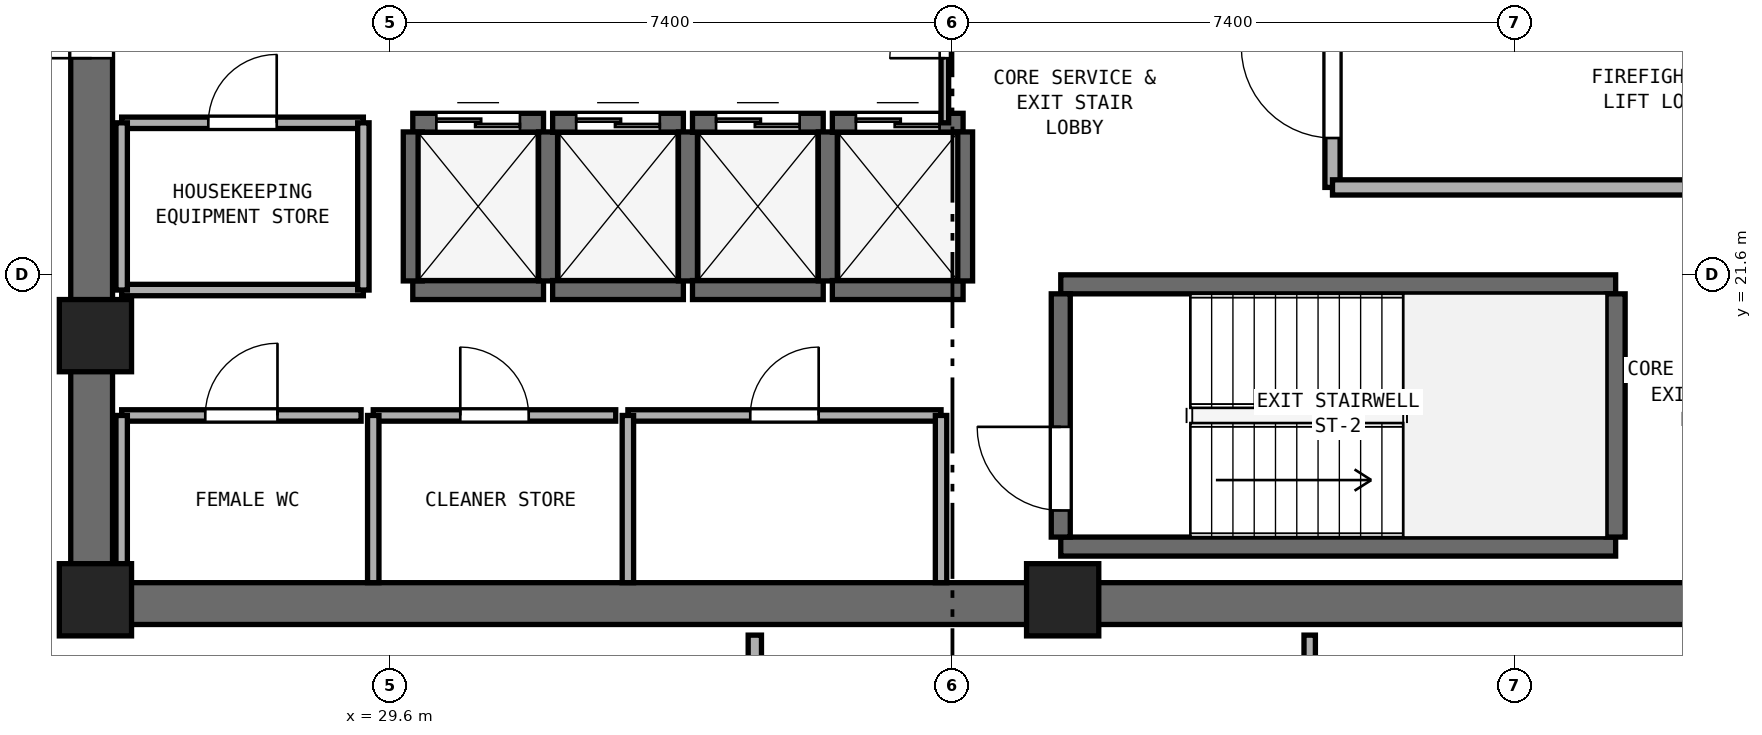
"""IFC4 building model, lengths in metres.
Left out: names, types, materials, properties, quantities, classifications, styles, units other than length and angle.
Written with IfcOpenShell. Run it as: python <this file> out.ifc"""

import sys

from ifc_helpers import new_model, si_unit, direction, frame, frame_2d, origin, origin_2d, place, context, subcontext, project, spatial, rectangle, extrude, element, fill, save


model = new_model("IFC4")
c1 = context("Model", 3, precision=1e-05, world=origin(), true_north=direction((0.0, 1.0)))
c2 = subcontext(c1, "Body", "Model", "MODEL_VIEW")
j1 = project(units=[si_unit("LENGTHUNIT", "METRE"), si_unit("PLANEANGLEUNIT", "RADIAN")], contexts=[c1])
p1 = place(None, origin())
s1 = spatial("IfcSite", under=j1, at=p1, CompositionType="ELEMENT")
p2 = place(p1, origin())
s2 = spatial("IfcBuilding", under=s1, at=p2, CompositionType="ELEMENT")
p3 = place(p2, frame((0.0, 0.0, 193.4)))
s3 = spatial("IfcBuildingStorey", under=s2, at=p3, CompositionType="ELEMENT", Elevation=193.4)
p4 = place(p3, frame((25.4, 17.275, 0.0), z_axis=(0.0, 0.0, 1.0), x_axis=(1.0, 0.0, 0.0)))
e1 = element("IfcWall", 1, at=p4, inside=s3, PredefinedType="SHEAR", context=c2, shape_type="SweptSolid", body=[
    extrude(rectangle(XDim=23.2, YDim=0.55, at=frame_2d((11.6, 0.0))), origin(), (0.0, 0.0, 1.0), 3.54),
])
p5 = place(p3, frame((25.675, 17.55, 0.0), z_axis=(0.0, 0.0, 1.0), x_axis=(0.0, 1.0, 0.0)))
e2 = element("IfcWall", 2, at=p5, inside=s3, PredefinedType="SHEAR", context=c2, shape_type="SweptSolid", body=[
    extrude(rectangle(XDim=15.3, YDim=0.55, at=frame_2d((7.65, 0.0))), origin(), (0.0, 0.0, 1.0), 3.54),
])
p6 = place(p5, frame((6.9, 0.0, 0.0)))
e3 = element("IfcOpeningElement", 3, at=p6, cuts=e2, PredefinedType="OPENING", context=c2, shape_type="SweptSolid", body=[
    extrude(rectangle(XDim=1.5, YDim=2.15, at=frame_2d((0.75, 1.075))), frame((0.0, 0.285, 0.0), z_axis=(0.0, -1.0, 0.0), x_axis=(1.0, 0.0, 0.0)), (0.0, 0.0, 1.0), 0.57),
])
for number, where, z_axis, x_axis in (
    (4, (25.725, 17.325, 0.0), (0.0, 0.0, 1.0), (1.0, 0.0, 0.0)),
    (5, (38.45, 17.325, 0.0), (0.0, 0.0, 1.0), (1.0, 0.0, 0.0)),
    (6, (25.725, 20.8, 0.0), (0.0, 0.0, 1.0), (1.0, 0.0, 0.0)),
):
    element("IfcColumn", number, at=place(p3, frame(where, z_axis=z_axis, x_axis=x_axis)), inside=s3, PredefinedType="PILASTER", context=c2, shape_type="SweptSolid", body=[
        extrude(rectangle(XDim=0.95, YDim=0.95, at=origin_2d()), origin(), (0.0, 0.0, 1.0), 3.8),
    ])
for number, where, z_axis, x_axis in (
    (7, (38.425, 18.025, 0.0), (0.0, 0.0, 1.0), (1.0, 0.0, 0.0)),
    (8, (38.425, 21.475, 0.0), (0.0, 0.0, 1.0), (1.0, 0.0, 0.0)),
):
    element("IfcWall", number, at=place(p3, frame(where, z_axis=z_axis, x_axis=x_axis)), inside=s3, PredefinedType="SHEAR", context=c2, shape_type="SweptSolid", body=[
        extrude(rectangle(XDim=7.3, YDim=0.25, at=frame_2d((3.65, 0.0))), origin(), (0.0, 0.0, 1.0), 3.54),
    ])
p7 = place(p3, frame((38.425, 18.15, 0.0), z_axis=(0.0, 0.0, 1.0), x_axis=(0.0, 1.0, 0.0)))
e9 = element("IfcWall", 9, at=p7, inside=s3, PredefinedType="SHEAR", context=c2, shape_type="SweptSolid", body=[
    extrude(rectangle(XDim=3.2, YDim=0.25, at=frame_2d((1.6, 0.0))), origin(), (0.0, 0.0, 1.0), 3.54),
])
p8 = place(p7, frame((0.35, 0.0, 0.0)))
e10 = element("IfcOpeningElement", 10, at=p8, cuts=e9, PredefinedType="OPENING", context=c2, shape_type="SweptSolid", body=[
    extrude(rectangle(XDim=1.1, YDim=2.15, at=frame_2d((0.55, 1.075))), frame((0.0, 0.135, 0.0), z_axis=(0.0, -1.0, 0.0), x_axis=(1.0, 0.0, 0.0)), (0.0, 0.0, 1.0), 0.27),
])
p9 = place(p3, frame((45.725, 18.15, 0.0), z_axis=(0.0, 0.0, 1.0), x_axis=(0.0, 1.0, 0.0)))
e11 = element("IfcWall", 11, at=p9, inside=s3, PredefinedType="SHEAR", context=c2, shape_type="SweptSolid", body=[
    extrude(rectangle(XDim=3.2, YDim=0.25, at=frame_2d((1.6, 0.0))), origin(), (0.0, 0.0, 1.0), 3.54),
])
p10 = place(p3, frame((29.9, 21.4, 0.0), z_axis=(0.0, 0.0, 1.0), x_axis=(1.0, 0.0, 0.0)))
e12 = element("IfcWall", 12, at=p10, inside=s3, PredefinedType="SHEAR", context=c2, shape_type="SweptSolid", body=[
    extrude(rectangle(XDim=1.72, YDim=0.25, at=frame_2d((0.86, 0.0))), origin(), (0.0, 0.0, 1.0), 3.54),
])
p11 = place(p3, frame((29.9, 23.6, 0.0), z_axis=(0.0, 0.0, 1.0), x_axis=(1.0, 0.0, 0.0)))
e13 = element("IfcWall", 13, at=p11, inside=s3, PredefinedType="SHEAR", context=c2, shape_type="SweptSolid", body=[
    extrude(rectangle(XDim=1.72, YDim=0.25, at=frame_2d((0.86, 0.0))), origin(), (0.0, 0.0, 1.0), 3.54),
])
p12 = place(p11, frame((0.31, 0.0, 0.0)))
e14 = element("IfcOpeningElement", 14, at=p12, cuts=e13, PredefinedType="OPENING", context=c2, shape_type="SweptSolid", body=[
    extrude(rectangle(XDim=1.1, YDim=2.15, at=frame_2d((0.55, 1.075))), frame((0.0, 0.135, 0.0), z_axis=(0.0, -1.0, 0.0), x_axis=(1.0, 0.0, 0.0)), (0.0, 0.0, 1.0), 0.27),
])
for number, where, z_axis, x_axis in (
    (15, (29.9, 21.52, 0.0), (0.0, 0.0, 1.0), (0.0, 1.0, 0.0)),
    (16, (31.68, 21.52, 0.0), (0.0, 0.0, 1.0), (0.0, 1.0, 0.0)),
):
    element("IfcWall", number, at=place(p3, frame(where, z_axis=z_axis, x_axis=x_axis)), inside=s3, PredefinedType="SHEAR", context=c2, shape_type="SweptSolid", body=[
        extrude(rectangle(XDim=1.96, YDim=0.25, at=frame_2d((0.98, 0.0))), origin(), (0.0, 0.0, 1.0), 3.54),
    ])
p13 = place(p3, frame((31.74, 21.4, 0.0), z_axis=(0.0, 0.0, 1.0), x_axis=(1.0, 0.0, 0.0)))
e17 = element("IfcWall", 17, at=p13, inside=s3, PredefinedType="SHEAR", context=c2, shape_type="SweptSolid", body=[
    extrude(rectangle(XDim=1.72, YDim=0.25, at=frame_2d((0.86, 0.0))), origin(), (0.0, 0.0, 1.0), 3.54),
])
p14 = place(p3, frame((31.74, 23.6, 0.0), z_axis=(0.0, 0.0, 1.0), x_axis=(1.0, 0.0, 0.0)))
e18 = element("IfcWall", 18, at=p14, inside=s3, PredefinedType="SHEAR", context=c2, shape_type="SweptSolid", body=[
    extrude(rectangle(XDim=1.72, YDim=0.25, at=frame_2d((0.86, 0.0))), origin(), (0.0, 0.0, 1.0), 3.54),
])
p15 = place(p14, frame((0.31, 0.0, 0.0)))
e19 = element("IfcOpeningElement", 19, at=p15, cuts=e18, PredefinedType="OPENING", context=c2, shape_type="SweptSolid", body=[
    extrude(rectangle(XDim=1.1, YDim=2.15, at=frame_2d((0.55, 1.075))), frame((0.0, 0.135, 0.0), z_axis=(0.0, -1.0, 0.0), x_axis=(1.0, 0.0, 0.0)), (0.0, 0.0, 1.0), 0.27),
])
p16 = place(p3, frame((33.52, 21.52, 0.0), z_axis=(0.0, 0.0, 1.0), x_axis=(0.0, 1.0, 0.0)))
e20 = element("IfcWall", 20, at=p16, inside=s3, PredefinedType="SHEAR", context=c2, shape_type="SweptSolid", body=[
    extrude(rectangle(XDim=1.96, YDim=0.25, at=frame_2d((0.98, 0.0))), origin(), (0.0, 0.0, 1.0), 3.54),
])
p17 = place(p3, frame((33.58, 21.4, 0.0), z_axis=(0.0, 0.0, 1.0), x_axis=(1.0, 0.0, 0.0)))
e21 = element("IfcWall", 21, at=p17, inside=s3, PredefinedType="SHEAR", context=c2, shape_type="SweptSolid", body=[
    extrude(rectangle(XDim=1.72, YDim=0.25, at=frame_2d((0.86, 0.0))), origin(), (0.0, 0.0, 1.0), 3.54),
])
p18 = place(p3, frame((33.58, 23.6, 0.0), z_axis=(0.0, 0.0, 1.0), x_axis=(1.0, 0.0, 0.0)))
e22 = element("IfcWall", 22, at=p18, inside=s3, PredefinedType="SHEAR", context=c2, shape_type="SweptSolid", body=[
    extrude(rectangle(XDim=1.72, YDim=0.25, at=frame_2d((0.86, 0.0))), origin(), (0.0, 0.0, 1.0), 3.54),
])
p19 = place(p18, frame((0.31, 0.0, 0.0)))
e23 = element("IfcOpeningElement", 23, at=p19, cuts=e22, PredefinedType="OPENING", context=c2, shape_type="SweptSolid", body=[
    extrude(rectangle(XDim=1.1, YDim=2.15, at=frame_2d((0.55, 1.075))), frame((0.0, 0.135, 0.0), z_axis=(0.0, -1.0, 0.0), x_axis=(1.0, 0.0, 0.0)), (0.0, 0.0, 1.0), 0.27),
])
p20 = place(p3, frame((35.36, 21.52, 0.0), z_axis=(0.0, 0.0, 1.0), x_axis=(0.0, 1.0, 0.0)))
e24 = element("IfcWall", 24, at=p20, inside=s3, PredefinedType="SHEAR", context=c2, shape_type="SweptSolid", body=[
    extrude(rectangle(XDim=1.96, YDim=0.25, at=frame_2d((0.98, 0.0))), origin(), (0.0, 0.0, 1.0), 3.54),
])
p21 = place(p3, frame((35.42, 21.4, 0.0), z_axis=(0.0, 0.0, 1.0), x_axis=(1.0, 0.0, 0.0)))
e25 = element("IfcWall", 25, at=p21, inside=s3, PredefinedType="SHEAR", context=c2, shape_type="SweptSolid", body=[
    extrude(rectangle(XDim=1.72, YDim=0.25, at=frame_2d((0.86, 0.0))), origin(), (0.0, 0.0, 1.0), 3.54),
])
p22 = place(p3, frame((35.42, 23.6, 0.0), z_axis=(0.0, 0.0, 1.0), x_axis=(1.0, 0.0, 0.0)))
e26 = element("IfcWall", 26, at=p22, inside=s3, PredefinedType="SHEAR", context=c2, shape_type="SweptSolid", body=[
    extrude(rectangle(XDim=1.72, YDim=0.25, at=frame_2d((0.86, 0.0))), origin(), (0.0, 0.0, 1.0), 3.54),
])
p23 = place(p22, frame((0.31, 0.0, 0.0)))
e27 = element("IfcOpeningElement", 27, at=p23, cuts=e26, PredefinedType="OPENING", context=c2, shape_type="SweptSolid", body=[
    extrude(rectangle(XDim=1.1, YDim=2.15, at=frame_2d((0.55, 1.075))), frame((0.0, 0.135, 0.0), z_axis=(0.0, -1.0, 0.0), x_axis=(1.0, 0.0, 0.0)), (0.0, 0.0, 1.0), 0.27),
])
p24 = place(p3, frame((37.14, 21.52, 0.0), z_axis=(0.0, 0.0, 1.0), x_axis=(0.0, 1.0, 0.0)))
e28 = element("IfcWall", 28, at=p24, inside=s3, PredefinedType="SHEAR", context=c2, shape_type="SweptSolid", body=[
    extrude(rectangle(XDim=1.96, YDim=0.25, at=frame_2d((0.98, 0.0))), origin(), (0.0, 0.0, 1.0), 3.54),
])
p25 = place(p3, frame((42.0, 22.75, 0.0), z_axis=(0.0, 0.0, 1.0), x_axis=(0.0, 1.0, 0.0)))
e29 = element("IfcWall", 29, at=p25, inside=s3, PredefinedType="SOLIDWALL", context=c2, shape_type="SweptSolid", body=[
    extrude(rectangle(XDim=6.05, YDim=0.2, at=frame_2d((3.025, 0.0))), origin(), (0.0, 0.0, 1.0), 3.54),
])
p26 = place(p25, frame((0.65, 0.0, 0.0)))
e30 = element("IfcOpeningElement", 30, at=p26, cuts=e29, PredefinedType="OPENING", context=c2, shape_type="SweptSolid", body=[
    extrude(rectangle(XDim=1.2, YDim=2.15, at=frame_2d((0.6, 1.075))), frame((0.0, 0.11, 0.0), z_axis=(0.0, -1.0, 0.0), x_axis=(1.0, 0.0, 0.0)), (0.0, 0.0, 1.0), 0.22),
])
p27 = place(p3, frame((42.0, 22.75, 0.0), z_axis=(0.0, 0.0, 1.0), x_axis=(1.0, 0.0, 0.0)))
e31 = element("IfcWall", 31, at=p27, inside=s3, PredefinedType="SOLIDWALL", context=c2, shape_type="SweptSolid", body=[
    extrude(rectangle(XDim=6.05, YDim=0.2, at=frame_2d((3.025, 0.0))), origin(), (0.0, 0.0, 1.0), 3.54),
])
p28 = place(p3, frame((26.07, 19.75, 0.0), z_axis=(0.0, 0.0, 1.0), x_axis=(1.0, 0.0, 0.0)))
e32 = element("IfcWall", 32, at=p28, inside=s3, PredefinedType="PARTITIONING", context=c2, shape_type="SweptSolid", body=[
    extrude(rectangle(XDim=3.15, YDim=0.15, at=frame_2d((1.575, 0.0))), origin(), (0.0, 0.0, 1.0), 3.54),
])
p29 = place(p28, frame((1.1, 0.0, 0.0)))
e33 = element("IfcOpeningElement", 33, at=p29, cuts=e32, PredefinedType="OPENING", context=c2, shape_type="SweptSolid", body=[
    extrude(rectangle(XDim=0.95, YDim=2.1, at=frame_2d((0.475, 1.05))), frame((0.0, 0.085, 0.0), z_axis=(0.0, -1.0, 0.0), x_axis=(1.0, 0.0, 0.0)), (0.0, 0.0, 1.0), 0.17),
])
p30 = place(p3, frame((26.07, 17.55, 0.0), z_axis=(0.0, 0.0, 1.0), x_axis=(0.0, 1.0, 0.0)))
e34 = element("IfcWall", 34, at=p30, inside=s3, PredefinedType="PARTITIONING", context=c2, shape_type="SweptSolid", body=[
    extrude(rectangle(XDim=2.2, YDim=0.15, at=frame_2d((1.1, 0.0))), origin(), (0.0, 0.0, 1.0), 2.64),
])
p31 = place(p3, frame((29.38, 19.75, 0.0), z_axis=(0.0, 0.0, 1.0), x_axis=(1.0, 0.0, 0.0)))
e35 = element("IfcWall", 35, at=p31, inside=s3, PredefinedType="PARTITIONING", context=c2, shape_type="SweptSolid", body=[
    extrude(rectangle(XDim=3.19, YDim=0.15, at=frame_2d((1.595, 0.0))), origin(), (0.0, 0.0, 1.0), 3.54),
])
p32 = place(p31, frame((1.145, 0.0, 0.0)))
e36 = element("IfcOpeningElement", 36, at=p32, cuts=e35, PredefinedType="OPENING", context=c2, shape_type="SweptSolid", body=[
    extrude(rectangle(XDim=0.9, YDim=2.1, at=frame_2d((0.45, 1.05))), frame((0.0, 0.085, 0.0), z_axis=(0.0, -1.0, 0.0), x_axis=(1.0, 0.0, 0.0)), (0.0, 0.0, 1.0), 0.17),
])
p33 = place(p3, frame((29.38, 17.55, 0.0), z_axis=(0.0, 0.0, 1.0), x_axis=(0.0, 1.0, 0.0)))
e37 = element("IfcWall", 37, at=p33, inside=s3, PredefinedType="PARTITIONING", context=c2, shape_type="SweptSolid", body=[
    extrude(rectangle(XDim=2.2, YDim=0.15, at=frame_2d((1.1, 0.0))), origin(), (0.0, 0.0, 1.0), 3.54),
])
p34 = place(p3, frame((32.73, 19.75, 0.0), z_axis=(0.0, 0.0, 1.0), x_axis=(1.0, 0.0, 0.0)))
e38 = element("IfcWall", 38, at=p34, inside=s3, PredefinedType="PARTITIONING", context=c2, shape_type="SweptSolid", body=[
    extrude(rectangle(XDim=4.12, YDim=0.15, at=frame_2d((2.06, 0.0))), origin(), (0.0, 0.0, 1.0), 3.54),
])
p35 = place(p34, frame((1.61, 0.0, 0.0)))
e39 = element("IfcOpeningElement", 39, at=p35, cuts=e38, PredefinedType="OPENING", context=c2, shape_type="SweptSolid", body=[
    extrude(rectangle(XDim=0.9, YDim=2.1, at=frame_2d((0.45, 1.05))), frame((0.0, 0.085, 0.0), z_axis=(0.0, -1.0, 0.0), x_axis=(1.0, 0.0, 0.0)), (0.0, 0.0, 1.0), 0.17),
])
for number, where, z_axis, x_axis in (
    (40, (32.73, 17.55, 0.0), (0.0, 0.0, 1.0), (0.0, 1.0, 0.0)),
    (41, (36.85, 17.55, 0.0), (0.0, 0.0, 1.0), (0.0, 1.0, 0.0)),
):
    element("IfcWall", number, at=place(p3, frame(where, z_axis=z_axis, x_axis=x_axis)), inside=s3, PredefinedType="PARTITIONING", context=c2, shape_type="SweptSolid", body=[
        extrude(rectangle(XDim=2.2, YDim=0.15, at=frame_2d((1.1, 0.0))), origin(), (0.0, 0.0, 1.0), 3.54),
    ])
p36 = place(p3, frame((26.07, 21.4, 0.0), z_axis=(0.0, 0.0, 1.0), x_axis=(1.0, 0.0, 0.0)))
e42 = element("IfcWall", 42, at=p36, inside=s3, PredefinedType="PARTITIONING", context=c2, shape_type="SweptSolid", body=[
    extrude(rectangle(XDim=3.18, YDim=0.15, at=frame_2d((1.59, 0.0))), origin(), (0.0, 0.0, 1.0), 3.54),
])
p37 = place(p3, frame((26.07, 23.6, 0.0), z_axis=(0.0, 0.0, 1.0), x_axis=(1.0, 0.0, 0.0)))
e43 = element("IfcWall", 43, at=p37, inside=s3, PredefinedType="PARTITIONING", context=c2, shape_type="SweptSolid", body=[
    extrude(rectangle(XDim=3.18, YDim=0.15, at=frame_2d((1.59, 0.0))), origin(), (0.0, 0.0, 1.0), 3.54),
])
p38 = place(p37, frame((1.14, 0.0, 0.0)))
e44 = element("IfcOpeningElement", 44, at=p38, cuts=e43, PredefinedType="OPENING", context=c2, shape_type="SweptSolid", body=[
    extrude(rectangle(XDim=0.9, YDim=2.1, at=frame_2d((0.45, 1.05))), frame((0.0, 0.085, 0.0), z_axis=(0.0, -1.0, 0.0), x_axis=(1.0, 0.0, 0.0)), (0.0, 0.0, 1.0), 0.17),
])
p39 = place(p3, frame((26.07, 21.4, 0.0), z_axis=(0.0, 0.0, 1.0), x_axis=(0.0, 1.0, 0.0)))
e45 = element("IfcWall", 45, at=p39, inside=s3, PredefinedType="PARTITIONING", context=c2, shape_type="SweptSolid", body=[
    extrude(rectangle(XDim=2.2, YDim=0.15, at=frame_2d((1.1, 0.0))), origin(), (0.0, 0.0, 1.0), 2.64),
])
p40 = place(p3, frame((29.25, 21.4, 0.0), z_axis=(0.0, 0.0, 1.0), x_axis=(0.0, 1.0, 0.0)))
e46 = element("IfcWall", 46, at=p40, inside=s3, PredefinedType="PARTITIONING", context=c2, shape_type="SweptSolid", body=[
    extrude(rectangle(XDim=2.2, YDim=0.15, at=frame_2d((1.1, 0.0))), origin(), (0.0, 0.0, 1.0), 3.54),
])
p41 = place(p3, frame((36.9, 23.6, 0.0), z_axis=(0.0, 0.0, 1.0), x_axis=(0.0, 1.0, 0.0)))
e47 = element("IfcWall", 47, at=p41, inside=s3, PredefinedType="PARTITIONING", context=c2, shape_type="SweptSolid", body=[
    extrude(rectangle(XDim=3.2, YDim=0.1, at=frame_2d((1.6, 0.0))), origin(), (0.0, 0.0, 1.0), 3.54),
])
p42 = place(p41, frame((0.85, 0.0, 0.0)))
e48 = element("IfcOpeningElement", 48, at=p42, cuts=e47, PredefinedType="OPENING", context=c2, shape_type="SweptSolid", body=[
    extrude(rectangle(XDim=1.45, YDim=2.12, at=frame_2d((0.725, 1.06))), frame((0.0, 0.06, 0.0), z_axis=(0.0, -1.0, 0.0), x_axis=(1.0, 0.0, 0.0)), (0.0, 0.0, 1.0), 0.12),
])
p43 = place(p3, frame((41.7, 2.49, 0.0), z_axis=(0.0, 0.0, 1.0), x_axis=(0.0, 1.0, 0.0)))
e49 = element("IfcWall", 49, at=p43, inside=s3, PredefinedType="PARTITIONING", context=c2, shape_type="SweptSolid", body=[
    extrude(rectangle(XDim=14.37, YDim=0.15, at=frame_2d((7.185, 0.0))), origin(), (0.0, 0.0, 1.0), 3.54),
])
p44 = place(p3, frame((34.4, 13.35, 0.0), z_axis=(0.0, 0.0, 1.0), x_axis=(0.0, 1.0, 0.0)))
e50 = element("IfcWall", 50, at=p44, inside=s3, PredefinedType="PARTITIONING", context=c2, shape_type="SweptSolid", body=[
    extrude(rectangle(XDim=3.51, YDim=0.175, at=frame_2d((1.755, 0.0))), origin(), (0.0, 0.0, 1.0), 3.54),
])
p45 = place(p8, origin())
e51 = element("IfcDoor", 51, at=p45, inside=s3, OperationType="SINGLE_SWING_RIGHT", PredefinedType="DOOR", context=c2, shape_type="SweptSolid", body=[
    extrude(rectangle(XDim=1.1, YDim=2.15, at=frame_2d((0.55, 1.075))), frame((0.0, 0.025, 0.0), z_axis=(0.0, -1.0, 0.0), x_axis=(1.0, 0.0, 0.0)), (0.0, 0.0, 1.0), 0.05),
])
fill(e10, e51)
p46 = place(p12, origin())
e52 = element("IfcDoor", 52, at=p46, inside=s3, OperationType="DOUBLE_DOOR_SLIDING", PredefinedType="DOOR", context=c2, shape_type="SweptSolid", body=[
    extrude(rectangle(XDim=1.1, YDim=2.15, at=frame_2d((0.55, 1.075))), frame((0.0, 0.025, 0.0), z_axis=(0.0, -1.0, 0.0), x_axis=(1.0, 0.0, 0.0)), (0.0, 0.0, 1.0), 0.05),
])
fill(e14, e52)
p47 = place(p15, origin())
e53 = element("IfcDoor", 53, at=p47, inside=s3, OperationType="DOUBLE_DOOR_SLIDING", PredefinedType="DOOR", context=c2, shape_type="SweptSolid", body=[
    extrude(rectangle(XDim=1.1, YDim=2.15, at=frame_2d((0.55, 1.075))), frame((0.0, 0.025, 0.0), z_axis=(0.0, -1.0, 0.0), x_axis=(1.0, 0.0, 0.0)), (0.0, 0.0, 1.0), 0.05),
])
fill(e19, e53)
p48 = place(p19, origin())
e54 = element("IfcDoor", 54, at=p48, inside=s3, OperationType="DOUBLE_DOOR_SLIDING", PredefinedType="DOOR", context=c2, shape_type="SweptSolid", body=[
    extrude(rectangle(XDim=1.1, YDim=2.15, at=frame_2d((0.55, 1.075))), frame((0.0, 0.025, 0.0), z_axis=(0.0, -1.0, 0.0), x_axis=(1.0, 0.0, 0.0)), (0.0, 0.0, 1.0), 0.05),
])
fill(e23, e54)
p49 = place(p23, origin())
e55 = element("IfcDoor", 55, at=p49, inside=s3, OperationType="DOUBLE_DOOR_SLIDING", PredefinedType="DOOR", context=c2, shape_type="SweptSolid", body=[
    extrude(rectangle(XDim=1.1, YDim=2.15, at=frame_2d((0.55, 1.075))), frame((0.0, 0.025, 0.0), z_axis=(0.0, -1.0, 0.0), x_axis=(1.0, 0.0, 0.0)), (0.0, 0.0, 1.0), 0.05),
])
fill(e27, e55)
p50 = place(p26, origin())
e56 = element("IfcDoor", 56, at=p50, inside=s3, OperationType="SINGLE_SWING_RIGHT", PredefinedType="DOOR", context=c2, shape_type="SweptSolid", body=[
    extrude(rectangle(XDim=1.2, YDim=2.15, at=frame_2d((0.6, 1.075))), frame((0.0, 0.025, 0.0), z_axis=(0.0, -1.0, 0.0), x_axis=(1.0, 0.0, 0.0)), (0.0, 0.0, 1.0), 0.05),
])
fill(e30, e56)
p51 = place(p6, origin())
e57 = element("IfcDoor", 57, at=p51, inside=s3, OperationType="DOUBLE_DOOR_SINGLE_SWING", PredefinedType="DOOR", context=c2, shape_type="SweptSolid", body=[
    extrude(rectangle(XDim=1.5, YDim=2.15, at=frame_2d((0.75, 1.075))), frame((0.0, 0.025, 0.0), z_axis=(0.0, -1.0, 0.0), x_axis=(1.0, 0.0, 0.0)), (0.0, 0.0, 1.0), 0.05),
])
fill(e3, e57)
p52 = place(p29, origin())
e58 = element("IfcDoor", 58, at=p52, inside=s3, OperationType="SINGLE_SWING_RIGHT", PredefinedType="DOOR", context=c2, shape_type="SweptSolid", body=[
    extrude(rectangle(XDim=0.95, YDim=2.1, at=frame_2d((0.475, 1.05))), frame((0.0, 0.025, 0.0), z_axis=(0.0, -1.0, 0.0), x_axis=(1.0, 0.0, 0.0)), (0.0, 0.0, 1.0), 0.05),
])
fill(e33, e58)
p53 = place(p32, origin())
e59 = element("IfcDoor", 59, at=p53, inside=s3, OperationType="SINGLE_SWING_LEFT", PredefinedType="DOOR", context=c2, shape_type="SweptSolid", body=[
    extrude(rectangle(XDim=0.9, YDim=2.1, at=frame_2d((0.45, 1.05))), frame((0.0, 0.025, 0.0), z_axis=(0.0, -1.0, 0.0), x_axis=(1.0, 0.0, 0.0)), (0.0, 0.0, 1.0), 0.05),
])
fill(e36, e59)
p54 = place(p35, origin())
e60 = element("IfcDoor", 60, at=p54, inside=s3, OperationType="SINGLE_SWING_RIGHT", PredefinedType="DOOR", context=c2, shape_type="SweptSolid", body=[
    extrude(rectangle(XDim=0.9, YDim=2.1, at=frame_2d((0.45, 1.05))), frame((0.0, 0.025, 0.0), z_axis=(0.0, -1.0, 0.0), x_axis=(1.0, 0.0, 0.0)), (0.0, 0.0, 1.0), 0.05),
])
fill(e39, e60)
p55 = place(p38, origin())
e61 = element("IfcDoor", 61, at=p55, inside=s3, OperationType="SINGLE_SWING_RIGHT", PredefinedType="DOOR", context=c2, shape_type="SweptSolid", body=[
    extrude(rectangle(XDim=0.9, YDim=2.1, at=frame_2d((0.45, 1.05))), frame((0.0, 0.025, 0.0), z_axis=(0.0, -1.0, 0.0), x_axis=(1.0, 0.0, 0.0)), (0.0, 0.0, 1.0), 0.05),
])
fill(e44, e61)
p56 = place(p42, origin())
e62 = element("IfcDoor", 62, at=p56, inside=s3, OperationType="DOUBLE_DOOR_SINGLE_SWING", PredefinedType="DOOR", context=c2, shape_type="SweptSolid", body=[
    extrude(rectangle(XDim=1.45, YDim=2.12, at=frame_2d((0.725, 1.06))), frame((0.0, 0.025, 0.0), z_axis=(0.0, -1.0, 0.0), x_axis=(1.0, 0.0, 0.0)), (0.0, 0.0, 1.0), 0.05),
])
fill(e48, e62)
save(model, sys.argv[1])
